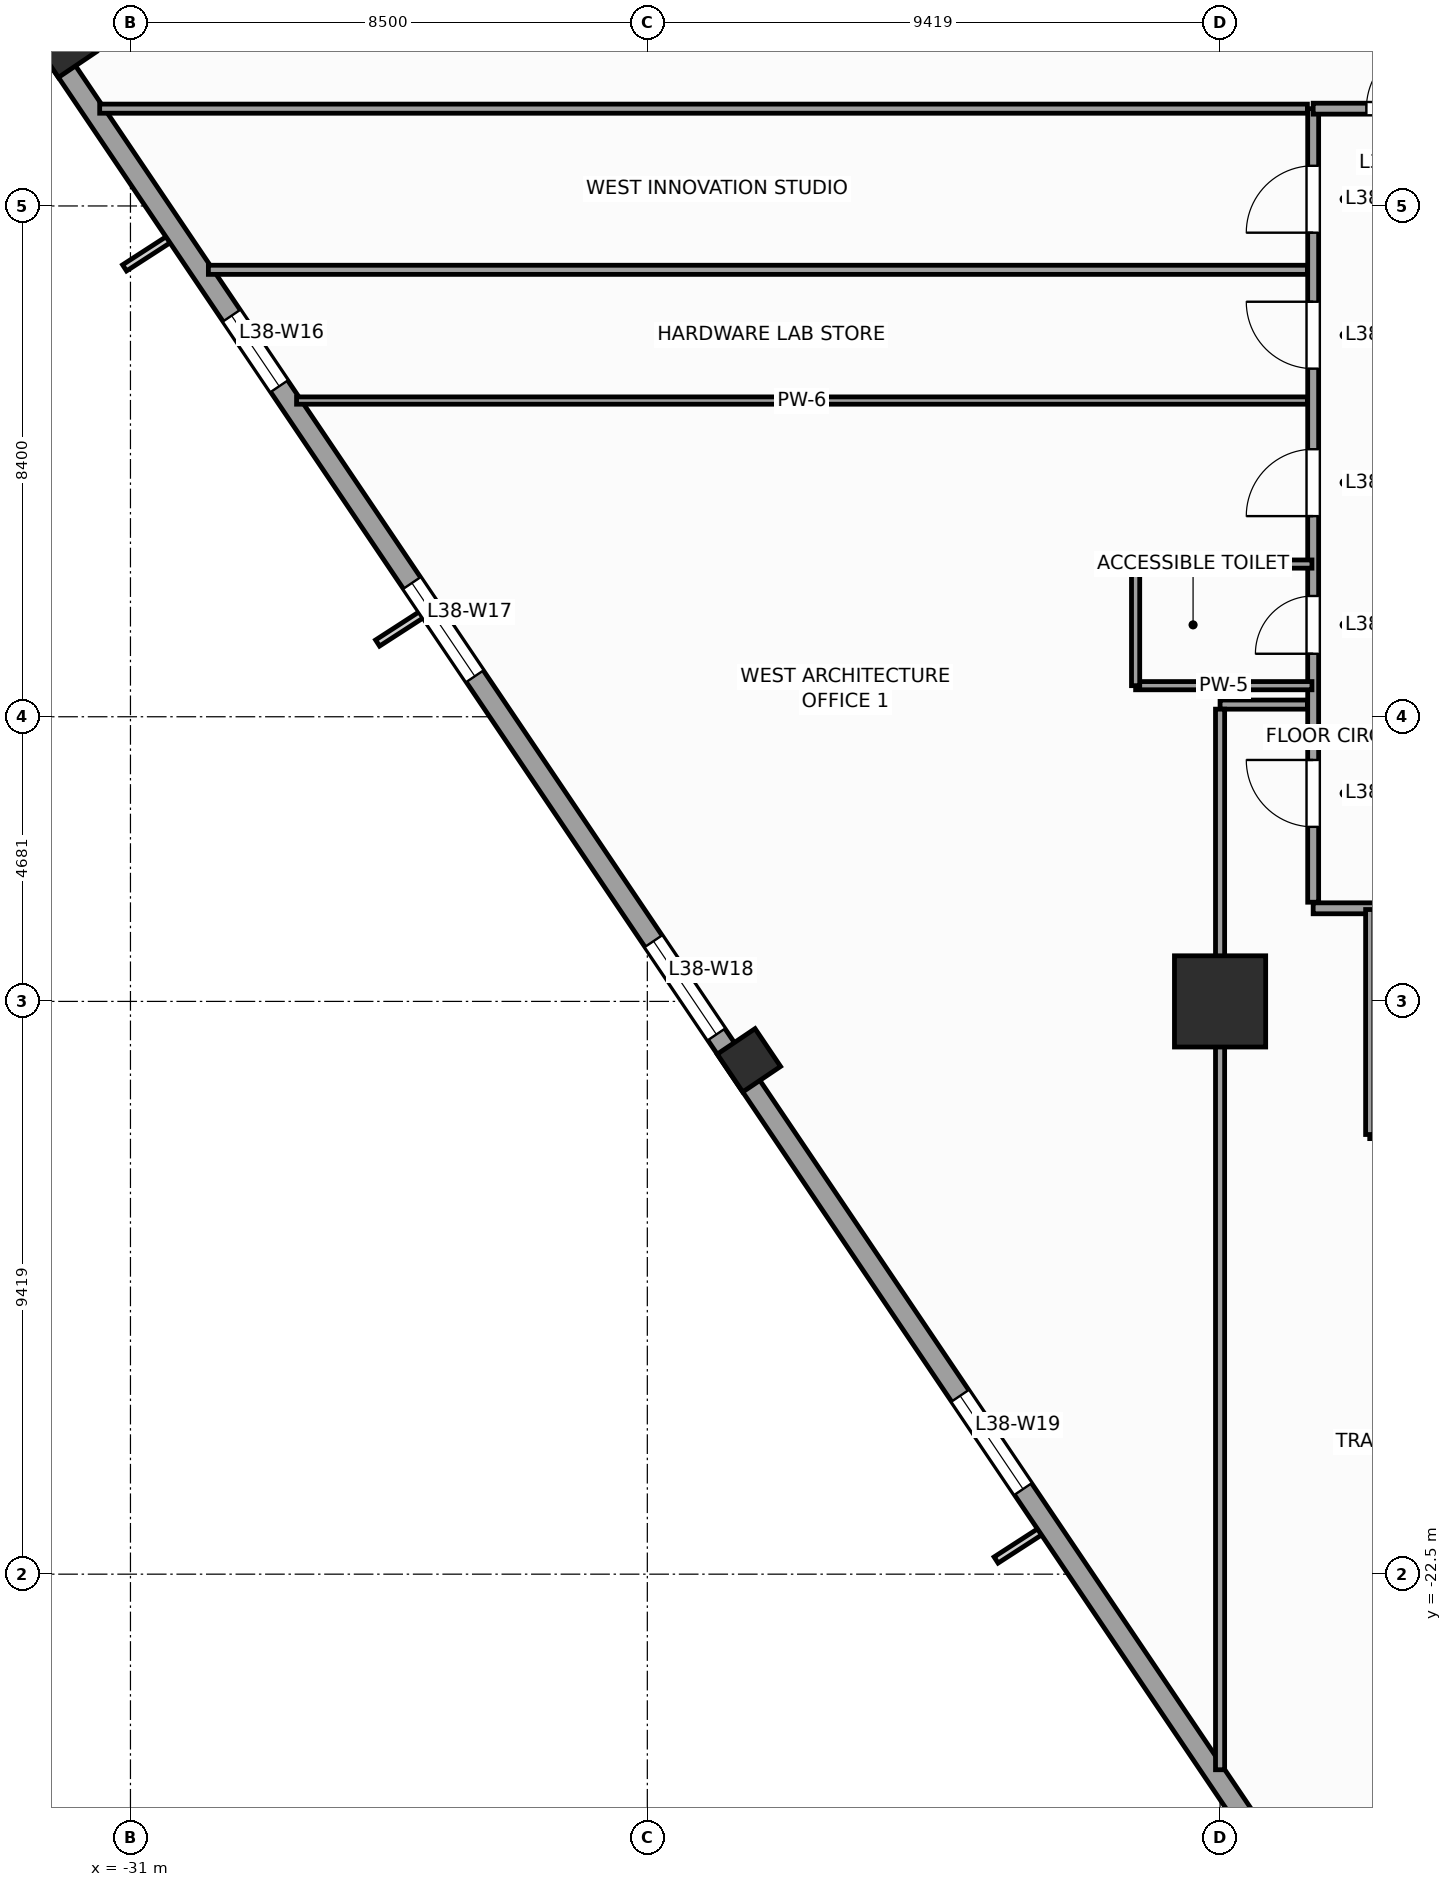
"""IFC4 building model, lengths in metres.
Left out: names, types, materials, properties, quantities, classifications, styles, units other than length and angle.
Written with IfcOpenShell. Run it as: python <this file> out.ifc"""

import sys

from ifc_helpers import new_model, si_unit, direction, frame, frame_2d, origin, origin_2d, place, context, subcontext, project, spatial, rectangle, extrude, source, transform, mapped, element, fill, save


model = new_model("IFC4")
c1 = context("Model", 3, precision=1e-05, world=origin(), true_north=direction((0.0, 1.0)))
c2 = subcontext(c1, "Body", "Model", "MODEL_VIEW")
j1 = project(units=[si_unit("LENGTHUNIT", "METRE"), si_unit("PLANEANGLEUNIT", "RADIAN")], contexts=[c1])
p1 = place(None, origin())
s1 = spatial("IfcSite", under=j1, at=p1, CompositionType="ELEMENT")
p2 = place(p1, origin())
s2 = spatial("IfcBuilding", under=s1, at=p2, CompositionType="ELEMENT")
p3 = place(p2, frame((0.0, 0.0, 160.4)))
s3 = spatial("IfcBuildingStorey", under=s2, at=p3, CompositionType="ELEMENT", Elevation=160.4)
m1 = source(origin(), c2, "Body", "SweptSolid", [
    extrude(rectangle(XDim=1.5, YDim=1.5, at=origin_2d()), origin(), (0.0, 0.0, 1.0), 4.0),
])
p4 = place(p3, frame((-13.081, -13.081, 0.0), z_axis=(0.0, 0.0, 1.0), x_axis=(1.0, 0.0, 0.0)))
e1 = element("IfcColumn", 1, at=p4, inside=s3, PredefinedType="COLUMN", context=c2, shape_type="MappedRepresentation", body=[
    mapped(m1, transform((0.0, 0.0, 0.0), scale=1.0)),
])
m2 = source(origin(), c2, "Body", "SweptSolid", [
    extrude(rectangle(XDim=0.75, YDim=0.75, at=origin_2d()), origin(), (0.0, 0.0, 1.0), 4.0),
])
for number, where, z_axis, x_axis in (
    (2, (-32.083, 2.635, 0.0), (0.0, 0.0, 1.0), (0.829, 0.559, 0.0)),
    (3, (-20.83, -14.05, 0.0), (0.0, 0.0, 1.0), (0.829, 0.559, 0.0)),
):
    element("IfcColumn", number, at=place(p3, frame(where, z_axis=z_axis, x_axis=x_axis)), inside=s3, PredefinedType="COLUMN", context=c2, shape_type="MappedRepresentation", body=[
        mapped(m2, transform((0.0, 0.0, 0.0), scale=1.0)),
    ])
p5 = place(p3, frame((-28.223, 5.486, 0.0), z_axis=(0.0, 0.0, 1.0), x_axis=(-0.82905227345, -0.559171107879, 0.0)))
e4 = element("IfcWall", 4, at=p5, inside=s3, PredefinedType="STANDARD", context=c2, shape_type="SweptSolid", body=[
    extrude(rectangle(XDim=5.17, YDim=0.34, at=frame_2d((2.585, 0.0))), origin(), (0.0, 0.0, 1.0), 3.04),
])
p6 = place(p5, frame((1.885, 0.0, 0.56)))
e5 = element("IfcOpeningElement", 5, at=p6, cuts=e4, PredefinedType="OPENING", context=c2, shape_type="SweptSolid", body=[
    extrude(rectangle(XDim=1.4, YDim=2.4, at=frame_2d((0.7, 1.2))), frame((0.0, 0.18, 0.0), z_axis=(0.0, -1.0, 0.0), x_axis=(1.0, 0.0, 0.0)), (0.0, 0.0, 1.0), 0.36),
])
p7 = place(p3, frame((-32.558, 2.972, 0.0), z_axis=(0.0, 0.0, 1.0), x_axis=(0.559194910251, -0.829036218961, 0.0)))
e6 = element("IfcWall", 6, at=p7, inside=s3, PredefinedType="STANDARD", context=c2, shape_type="SweptSolid", body=[
    extrude(rectangle(XDim=41.34, YDim=0.34, at=frame_2d((20.67, 0.0))), origin(), (0.0, 0.0, 1.0), 3.04),
])
p8 = place(p7, frame((5.761, 0.0, 0.56)))
e7 = element("IfcOpeningElement", 7, at=p8, cuts=e6, PredefinedType="OPENING", context=c2, shape_type="SweptSolid", body=[
    extrude(rectangle(XDim=1.4, YDim=2.4, at=frame_2d((0.7, 1.2))), frame((0.0, 0.18, 0.0), z_axis=(0.0, -1.0, 0.0), x_axis=(1.0, 0.0, 0.0)), (0.0, 0.0, 1.0), 0.36),
])
p9 = place(p7, frame((11.064, 0.0, 0.61)))
e8 = element("IfcOpeningElement", 8, at=p9, cuts=e6, PredefinedType="OPENING", context=c2, shape_type="SweptSolid", body=[
    extrude(rectangle(XDim=1.85, YDim=2.35, at=frame_2d((0.925, 1.175))), frame((0.0, 0.18, 0.0), z_axis=(0.0, -1.0, 0.0), x_axis=(1.0, 0.0, 0.0)), (0.0, 0.0, 1.0), 0.36),
])
p10 = place(p7, frame((18.168, 0.0, 0.61)))
e9 = element("IfcOpeningElement", 9, at=p10, cuts=e6, PredefinedType="OPENING", context=c2, shape_type="SweptSolid", body=[
    extrude(rectangle(XDim=1.85, YDim=2.35, at=frame_2d((0.925, 1.175))), frame((0.0, 0.18, 0.0), z_axis=(0.0, -1.0, 0.0), x_axis=(1.0, 0.0, 0.0)), (0.0, 0.0, 1.0), 0.36),
])
p11 = place(p7, frame((27.186, 0.0, 0.61)))
e10 = element("IfcOpeningElement", 10, at=p11, cuts=e6, PredefinedType="OPENING", context=c2, shape_type="SweptSolid", body=[
    extrude(rectangle(XDim=1.85, YDim=2.35, at=frame_2d((0.925, 1.175))), frame((0.0, 0.18, 0.0), z_axis=(0.0, -1.0, 0.0), x_axis=(1.0, 0.0, 0.0)), (0.0, 0.0, 1.0), 0.36),
])
p12 = place(p7, frame((35.602, 0.0, 0.56)))
e11 = element("IfcOpeningElement", 11, at=p12, cuts=e6, PredefinedType="OPENING", context=c2, shape_type="SweptSolid", body=[
    extrude(rectangle(XDim=1.4, YDim=2.4, at=frame_2d((0.7, 1.2))), frame((0.0, 0.18, 0.0), z_axis=(0.0, -1.0, 0.0), x_axis=(1.0, 0.0, 0.0)), (0.0, 0.0, 1.0), 0.36),
])
p13 = place(p3, frame((-11.55, -11.55, 0.0), z_axis=(0.0, 0.0, 1.0), x_axis=(1.0, 0.0, 0.0)))
e12 = element("IfcWall", 12, at=p13, inside=s3, PredefinedType="PARTITIONING", context=c2, shape_type="SweptSolid", body=[
    extrude(rectangle(XDim=22.0, YDim=0.18, at=frame_2d((11.0, 0.0))), origin(), (0.0, 0.0, 1.0), 3.74),
])
p14 = place(p13, frame((1.58, 0.0, 0.0)))
e13 = element("IfcOpeningElement", 13, at=p14, cuts=e12, PredefinedType="OPENING", context=c2, shape_type="SweptSolid", body=[
    extrude(rectangle(XDim=0.95, YDim=2.1, at=frame_2d((0.475, 1.05))), frame((0.0, 0.1, 0.0), z_axis=(0.0, -1.0, 0.0), x_axis=(1.0, 0.0, 0.0)), (0.0, 0.0, 1.0), 0.2),
])
p15 = place(p13, frame((6.75, 0.0, 0.0)))
e14 = element("IfcOpeningElement", 14, at=p15, cuts=e12, PredefinedType="OPENING", context=c2, shape_type="SweptSolid", body=[
    extrude(rectangle(XDim=1.1, YDim=2.2, at=frame_2d((0.55, 1.1))), frame((0.0, 0.1, 0.0), z_axis=(0.0, -1.0, 0.0), x_axis=(1.0, 0.0, 0.0)), (0.0, 0.0, 1.0), 0.2),
])
p16 = place(p13, frame((11.25, 0.0, 0.0)))
e15 = element("IfcOpeningElement", 15, at=p16, cuts=e12, PredefinedType="OPENING", context=c2, shape_type="SweptSolid", body=[
    extrude(rectangle(XDim=1.1, YDim=2.2, at=frame_2d((0.55, 1.1))), frame((0.0, 0.1, 0.0), z_axis=(0.0, -1.0, 0.0), x_axis=(1.0, 0.0, 0.0)), (0.0, 0.0, 1.0), 0.2),
])
p17 = place(p13, frame((15.75, 0.0, 0.0)))
e16 = element("IfcOpeningElement", 16, at=p17, cuts=e12, PredefinedType="OPENING", context=c2, shape_type="SweptSolid", body=[
    extrude(rectangle(XDim=1.1, YDim=2.2, at=frame_2d((0.55, 1.1))), frame((0.0, 0.1, 0.0), z_axis=(0.0, -1.0, 0.0), x_axis=(1.0, 0.0, 0.0)), (0.0, 0.0, 1.0), 0.2),
])
p18 = place(p13, frame((19.561, 0.0, 0.0)))
e17 = element("IfcOpeningElement", 17, at=p18, cuts=e12, PredefinedType="OPENING", context=c2, shape_type="SweptSolid", body=[
    extrude(rectangle(XDim=1.1, YDim=2.2, at=frame_2d((0.55, 1.1))), frame((0.0, 0.1, 0.0), z_axis=(0.0, -1.0, 0.0), x_axis=(1.0, 0.0, 0.0)), (0.0, 0.0, 1.0), 0.2),
])
p19 = place(p3, frame((-11.55, -11.45, 0.0), z_axis=(0.0, 0.0, 1.0), x_axis=(0.0, 1.0, 0.0)))
e18 = element("IfcWall", 18, at=p19, inside=s3, PredefinedType="PARTITIONING", context=c2, shape_type="SweptSolid", body=[
    extrude(rectangle(XDim=13.05, YDim=0.18, at=frame_2d((6.525, 0.0))), origin(), (0.0, 0.0, 1.0), 3.74),
])
p20 = place(p19, frame((4.086, 0.0, 0.0)))
e19 = element("IfcOpeningElement", 19, at=p20, cuts=e18, PredefinedType="OPENING", context=c2, shape_type="SweptSolid", body=[
    extrude(rectangle(XDim=0.95, YDim=2.1, at=frame_2d((0.475, 1.05))), frame((0.0, 0.1, 0.0), z_axis=(0.0, -1.0, 0.0), x_axis=(1.0, 0.0, 0.0)), (0.0, 0.0, 1.0), 0.2),
])
p21 = place(p19, frame((11.01, 0.0, 0.0)))
e20 = element("IfcOpeningElement", 20, at=p21, cuts=e18, PredefinedType="OPENING", context=c2, shape_type="SweptSolid", body=[
    extrude(rectangle(XDim=1.1, YDim=2.2, at=frame_2d((0.55, 1.1))), frame((0.0, 0.1, 0.0), z_axis=(0.0, -1.0, 0.0), x_axis=(1.0, 0.0, 0.0)), (0.0, 0.0, 1.0), 0.2),
])
p22 = place(p19, frame((8.775, 0.0, 0.0)))
e21 = element("IfcOpeningElement", 21, at=p22, cuts=e18, PredefinedType="OPENING", context=c2, shape_type="SweptSolid", body=[
    extrude(rectangle(XDim=1.1, YDim=2.2, at=frame_2d((0.55, 1.1))), frame((0.0, 0.1, 0.0), z_axis=(0.0, -1.0, 0.0), x_axis=(1.0, 0.0, 0.0)), (0.0, 0.0, 1.0), 0.2),
])
p23 = place(p19, frame((6.35, 0.0, 0.0)))
e22 = element("IfcOpeningElement", 22, at=p23, cuts=e18, PredefinedType="OPENING", context=c2, shape_type="SweptSolid", body=[
    extrude(rectangle(XDim=1.1, YDim=2.2, at=frame_2d((0.55, 1.1))), frame((0.0, 0.1, 0.0), z_axis=(0.0, -1.0, 0.0), x_axis=(1.0, 0.0, 0.0)), (0.0, 0.0, 1.0), 0.2),
])
p24 = place(p19, frame((1.24, 0.0, 0.0)))
e23 = element("IfcOpeningElement", 23, at=p24, cuts=e18, PredefinedType="OPENING", context=c2, shape_type="SweptSolid", body=[
    extrude(rectangle(XDim=1.1, YDim=2.2, at=frame_2d((0.55, 1.1))), frame((0.0, 0.1, 0.0), z_axis=(0.0, -1.0, 0.0), x_axis=(1.0, 0.0, 0.0)), (0.0, 0.0, 1.0), 0.2),
])
p25 = place(p3, frame((-11.55, 1.6, 0.0), z_axis=(0.0, 0.0, 1.0), x_axis=(1.0, 0.0, 0.0)))
e24 = element("IfcWall", 24, at=p25, inside=s3, PredefinedType="PARTITIONING", context=c2, shape_type="SweptSolid", body=[
    extrude(rectangle(XDim=2.85, YDim=0.18, at=frame_2d((1.425, 0.0))), origin(), (0.0, 0.0, 1.0), 3.74),
])
p26 = place(p25, frame((0.875, 0.0, 0.0)))
e25 = element("IfcOpeningElement", 25, at=p26, cuts=e24, PredefinedType="OPENING", context=c2, shape_type="SweptSolid", body=[
    extrude(rectangle(XDim=1.1, YDim=2.2, at=frame_2d((0.55, 1.1))), frame((0.0, 0.1, 0.0), z_axis=(0.0, -1.0, 0.0), x_axis=(1.0, 0.0, 0.0)), (0.0, 0.0, 1.0), 0.2),
])
p27 = place(p3, frame((-29.719, -1.05, 0.0), z_axis=(0.0, 0.0, 1.0), x_axis=(1.0, 0.0, 0.0)))
e26 = element("IfcWall", 26, at=p27, inside=s3, PredefinedType="PARTITIONING", context=c2, shape_type="SweptSolid", body=[
    extrude(rectangle(XDim=18.073, YDim=0.15, at=frame_2d((9.037, 0.0))), origin(), (0.0, 0.0, 1.0), 3.74),
])
p28 = place(p3, frame((-31.506, 1.6, 0.0), z_axis=(0.0, 0.0, 1.0), x_axis=(1.0, 0.0, 0.0)))
e27 = element("IfcWall", 27, at=p28, inside=s3, PredefinedType="PARTITIONING", context=c2, shape_type="SweptSolid", body=[
    extrude(rectangle(XDim=19.861, YDim=0.15, at=frame_2d((9.931, 0.0))), origin(), (0.0, 0.0, 1.0), 3.74),
])
p29 = place(p3, frame((-11.645, -8.2, 0.0), z_axis=(0.0, 0.0, 1.0), x_axis=(-1.0, 0.0, 0.0)))
e28 = element("IfcWall", 28, at=p29, inside=s3, PredefinedType="PARTITIONING", context=c2, shape_type="SweptSolid", body=[
    extrude(rectangle(XDim=1.436, YDim=0.15, at=frame_2d((0.718, 0.0))), origin(), (0.0, 0.0, 1.0), 3.74),
])
p30 = place(p3, frame((-13.081, -8.275, 0.0), z_axis=(0.0, 0.0, 1.0), x_axis=(0.0, -1.0, 0.0)))
e29 = element("IfcWall", 29, at=p30, inside=s3, PredefinedType="PARTITIONING", context=c2, shape_type="SweptSolid", body=[
    extrude(rectangle(XDim=17.441, YDim=0.15, at=frame_2d((8.721, 0.0))), origin(), (0.0, 0.0, 1.0), 2.84),
])
p31 = place(p3, frame((-28.268, -3.2, 0.0), z_axis=(0.0, 0.0, 1.0), x_axis=(1.0, 0.0, 0.0)))
e30 = element("IfcWall", 30, at=p31, inside=s3, PredefinedType="PARTITIONING", context=c2, shape_type="SweptSolid", body=[
    extrude(rectangle(XDim=16.623, YDim=0.12, at=frame_2d((8.312, 0.0))), origin(), (0.0, 0.0, 1.0), 3.74),
])
for number, where, z_axis, x_axis in (
    (31, (-14.47, -7.889, 0.0), (0.0, 0.0, 1.0), (1.0, 0.0, 0.0)),
    (32, (-14.47, -5.889, 0.0), (0.0, 0.0, 1.0), (1.0, 0.0, 0.0)),
):
    element("IfcWall", number, at=place(p3, frame(where, z_axis=z_axis, x_axis=x_axis)), inside=s3, PredefinedType="PARTITIONING", context=c2, shape_type="SweptSolid", body=[
        extrude(rectangle(XDim=2.9, YDim=0.135, at=frame_2d((1.45, 0.0))), origin(), (0.0, 0.0, 1.0), 3.74),
    ])
p32 = place(p3, frame((-14.47, -7.889, 0.0), z_axis=(0.0, 0.0, 1.0), x_axis=(0.0, 1.0, 0.0)))
e33 = element("IfcWall", 33, at=p32, inside=s3, PredefinedType="PARTITIONING", context=c2, shape_type="SweptSolid", body=[
    extrude(rectangle(XDim=2.0, YDim=0.135, at=frame_2d((1.0, 0.0))), origin(), (0.0, 0.0, 1.0), 3.74),
])
p33 = place(p3, frame((-10.62, -15.27, 0.0), z_axis=(0.0, 0.0, 1.0), x_axis=(1.0, 0.0, 0.0)))
e34 = element("IfcWall", 34, at=p33, inside=s3, PredefinedType="PARTITIONING", context=c2, shape_type="SweptSolid", body=[
    extrude(rectangle(XDim=2.25, YDim=0.135, at=frame_2d((1.125, 0.0))), origin(), (0.0, 0.0, 1.0), 3.74),
])
p34 = place(p3, frame((-10.62, -15.27, 0.0), z_axis=(0.0, 0.0, 1.0), x_axis=(0.0, 1.0, 0.0)))
e35 = element("IfcWall", 35, at=p34, inside=s3, PredefinedType="PARTITIONING", context=c2, shape_type="SweptSolid", body=[
    extrude(rectangle(XDim=3.7, YDim=0.135, at=frame_2d((1.85, 0.0))), origin(), (0.0, 0.0, 1.0), 3.74),
])
m3 = source(origin(), c2, "Body", "SweptSolid", [
    extrude(rectangle(XDim=1.4, YDim=2.4, at=frame_2d((0.7, 1.2))), frame((0.0, 0.03, 0.0), z_axis=(0.0, -1.0, 0.0), x_axis=(1.0, 0.0, 0.0)), (0.0, 0.0, 1.0), 0.06),
])
p35 = place(p8, origin())
e36 = element("IfcWindow", 36, at=p35, inside=s3, PartitioningType="SINGLE_PANEL", PredefinedType="WINDOW", context=c2, shape_type="MappedRepresentation", body=[
    mapped(m3, transform((0.0, 0.0, 0.0), scale=1.0)),
])
fill(e7, e36)
m4 = source(origin(), c2, "Body", "SweptSolid", [
    extrude(rectangle(XDim=1.85, YDim=2.35, at=frame_2d((0.925, 1.175))), frame((0.0, 0.03, 0.0), z_axis=(0.0, -1.0, 0.0), x_axis=(1.0, 0.0, 0.0)), (0.0, 0.0, 1.0), 0.06),
])
p36 = place(p9, origin())
e37 = element("IfcWindow", 37, at=p36, inside=s3, PartitioningType="SINGLE_PANEL", PredefinedType="WINDOW", context=c2, shape_type="MappedRepresentation", body=[
    mapped(m4, transform((0.0, 0.0, 0.0), scale=1.0)),
])
fill(e8, e37)
p37 = place(p10, origin())
e38 = element("IfcWindow", 38, at=p37, inside=s3, PartitioningType="SINGLE_PANEL", PredefinedType="WINDOW", context=c2, shape_type="MappedRepresentation", body=[
    mapped(m4, transform((0.0, 0.0, 0.0), scale=1.0)),
])
fill(e9, e38)
p38 = place(p11, origin())
e39 = element("IfcWindow", 39, at=p38, inside=s3, PartitioningType="SINGLE_PANEL", PredefinedType="WINDOW", context=c2, shape_type="MappedRepresentation", body=[
    mapped(m4, transform((0.0, 0.0, 0.0), scale=1.0)),
])
fill(e10, e39)
m5 = source(origin(), c2, "Body", "SweptSolid", [
    extrude(rectangle(XDim=0.95, YDim=2.1, at=frame_2d((0.475, 1.05))), frame((0.0, 0.025, 0.0), z_axis=(0.0, -1.0, 0.0), x_axis=(1.0, 0.0, 0.0)), (0.0, 0.0, 1.0), 0.05),
])
p39 = place(p20, origin())
e40 = element("IfcDoor", 40, at=p39, inside=s3, OperationType="SINGLE_SWING_LEFT", PredefinedType="DOOR", context=c2, shape_type="MappedRepresentation", body=[
    mapped(m5, transform((0.0, 0.0, 0.0), scale=1.0)),
])
fill(e19, e40)
m6 = source(origin(), c2, "Body", "SweptSolid", [
    extrude(rectangle(XDim=1.1, YDim=2.2, at=frame_2d((0.55, 1.1))), frame((0.0, 0.025, 0.0), z_axis=(0.0, -1.0, 0.0), x_axis=(1.0, 0.0, 0.0)), (0.0, 0.0, 1.0), 0.05),
])
p40 = place(p21, origin())
e41 = element("IfcDoor", 41, at=p40, inside=s3, OperationType="SINGLE_SWING_LEFT", PredefinedType="DOOR", context=c2, shape_type="MappedRepresentation", body=[
    mapped(m6, transform((0.0, 0.0, 0.0), scale=1.0)),
])
fill(e20, e41)
p41 = place(p26, origin())
e42 = element("IfcDoor", 42, at=p41, inside=s3, OperationType="SINGLE_SWING_RIGHT", PredefinedType="DOOR", context=c2, shape_type="MappedRepresentation", body=[
    mapped(m6, transform((0.0, 0.0, 0.0), scale=1.0)),
])
fill(e25, e42)
p42 = place(p22, origin())
e43 = element("IfcDoor", 43, at=p42, inside=s3, OperationType="SINGLE_SWING_RIGHT", PredefinedType="DOOR", context=c2, shape_type="MappedRepresentation", body=[
    mapped(m6, transform((0.0, 0.0, 0.0), scale=1.0)),
])
fill(e21, e43)
p43 = place(p23, origin())
e44 = element("IfcDoor", 44, at=p43, inside=s3, OperationType="SINGLE_SWING_LEFT", PredefinedType="DOOR", context=c2, shape_type="MappedRepresentation", body=[
    mapped(m6, transform((0.0, 0.0, 0.0), scale=1.0)),
])
fill(e22, e44)
p44 = place(p24, origin())
e45 = element("IfcDoor", 45, at=p44, inside=s3, OperationType="SINGLE_SWING_RIGHT", PredefinedType="DOOR", context=c2, shape_type="MappedRepresentation", body=[
    mapped(m6, transform((0.0, 0.0, 0.0), scale=1.0)),
])
fill(e23, e45)
save(model, sys.argv[1])
